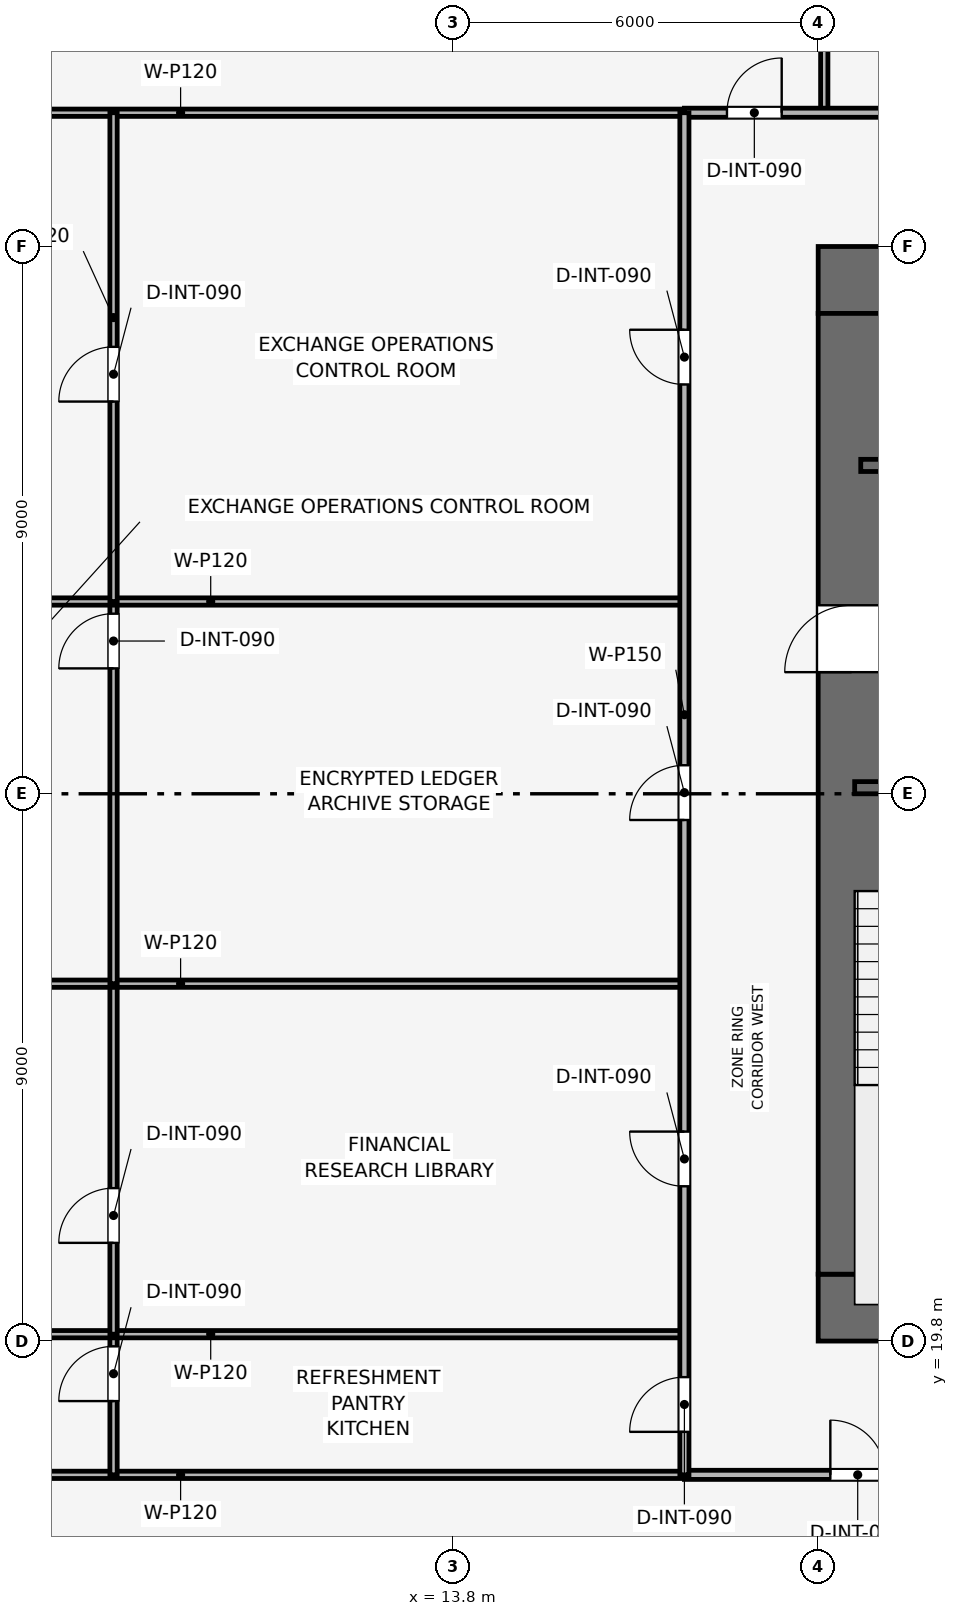
"""IFC4 building model, lengths in metres.
Left out: names, types, materials, properties, quantities, classifications, styles, units other than length and angle.
Written with IfcOpenShell. Run it as: python <this file> out.ifc"""

import sys

from ifc_helpers import new_model, si_unit, direction, frame, frame_2d, origin, place, context, subcontext, project, spatial, rectangle, extrude, element, fill, save


model = new_model("IFC4")
c1 = context("Model", 3, precision=1e-05, world=origin(), true_north=direction((0.0, 1.0)))
c2 = subcontext(c1, "Body", "Model", "MODEL_VIEW")
j1 = project(units=[si_unit("LENGTHUNIT", "METRE"), si_unit("PLANEANGLEUNIT", "RADIAN")], contexts=[c1])
p1 = place(None, origin())
s1 = spatial("IfcSite", under=j1, at=p1, CompositionType="ELEMENT")
p2 = place(p1, origin())
s2 = spatial("IfcBuilding", under=s1, at=p2, CompositionType="ELEMENT")
p3 = place(p2, frame((0.0, 0.0, 53.4)))
s3 = spatial("IfcBuildingStorey", under=s2, at=p3, CompositionType="ELEMENT", Elevation=53.4)
p4 = place(p3, frame((19.8, 20.35, 0.0), z_axis=(0.0, 0.0, 1.0), x_axis=(1.0, 0.0, 0.0)))
e1 = element("IfcWall", 1, at=p4, inside=s3, PredefinedType="SHEAR", context=c2, shape_type="SweptSolid", body=[
    extrude(rectangle(XDim=18.0, YDim=1.1, at=frame_2d((9.0, 0.0))), origin(), (0.0, 0.0, 1.0), 3.9),
])
p5 = place(p4, frame((8.4, 0.0, 0.0)))
e2 = element("IfcOpeningElement", 2, at=p5, cuts=e1, PredefinedType="OPENING", context=c2, shape_type="SweptSolid", body=[
    extrude(rectangle(XDim=1.2, YDim=2.2, at=frame_2d((0.6, 1.1))), frame((0.0, 0.56, 0.0), z_axis=(0.0, -1.0, 0.0), x_axis=(1.0, 0.0, 0.0)), (0.0, 0.0, 1.0), 1.12),
])
p6 = place(p3, frame((19.8, 37.25, 0.0), z_axis=(0.0, 0.0, 1.0), x_axis=(1.0, 0.0, 0.0)))
e3 = element("IfcWall", 3, at=p6, inside=s3, PredefinedType="SHEAR", context=c2, shape_type="SweptSolid", body=[
    extrude(rectangle(XDim=18.0, YDim=1.1, at=frame_2d((9.0, 0.0))), origin(), (0.0, 0.0, 1.0), 3.9),
])
p7 = place(p6, frame((7.05, 0.0, 0.0)))
e4 = element("IfcOpeningElement", 4, at=p7, cuts=e3, PredefinedType="OPENING", context=c2, shape_type="SweptSolid", body=[
    extrude(rectangle(XDim=1.1, YDim=2.15, at=frame_2d((0.55, 1.075))), frame((0.0, 0.56, 0.0), z_axis=(0.0, -1.0, 0.0), x_axis=(1.0, 0.0, 0.0)), (0.0, 0.0, 1.0), 1.12),
])
p8 = place(p3, frame((20.35, 20.9, 0.0), z_axis=(0.0, 0.0, 1.0), x_axis=(0.0, 1.0, 0.0)))
e5 = element("IfcWall", 5, at=p8, inside=s3, PredefinedType="SHEAR", context=c2, shape_type="SweptSolid", body=[
    extrude(rectangle(XDim=15.8, YDim=1.1, at=frame_2d((7.9, 0.0))), origin(), (0.0, 0.0, 1.0), 3.9),
])
p9 = place(p8, frame((9.9, 0.0, 0.0)))
e6 = element("IfcOpeningElement", 6, at=p9, cuts=e5, PredefinedType="OPENING", context=c2, shape_type="SweptSolid", body=[
    extrude(rectangle(XDim=1.1, YDim=2.15, at=frame_2d((0.55, 1.075))), frame((0.0, 0.56, 0.0), z_axis=(0.0, -1.0, 0.0), x_axis=(1.0, 0.0, 0.0)), (0.0, 0.0, 1.0), 1.12),
])
p10 = place(p3, frame((20.4, 28.9, 0.0), z_axis=(0.0, 0.0, 1.0), x_axis=(1.0, 0.0, 0.0)))
e7 = element("IfcWall", 7, at=p10, inside=s3, PredefinedType="SHEAR", context=c2, shape_type="SweptSolid", body=[
    extrude(rectangle(XDim=3.15, YDim=0.2, at=frame_2d((1.575, 0.0))), origin(), (0.0, 0.0, 1.0), 3.65),
])
p11 = place(p10, frame((0.8, 0.0, 0.0)))
e8 = element("IfcOpeningElement", 8, at=p11, cuts=e7, PredefinedType="OPENING", context=c2, shape_type="SweptSolid", body=[
    extrude(rectangle(XDim=1.0, YDim=2.1, at=frame_2d((0.5, 1.05))), frame((0.0, 0.11, 0.0), z_axis=(0.0, -1.0, 0.0), x_axis=(1.0, 0.0, 0.0)), (0.0, 0.0, 1.0), 0.22),
])
p12 = place(p3, frame((20.5, 34.2, 0.0), z_axis=(0.0, 0.0, 1.0), x_axis=(1.0, 0.0, 0.0)))
e9 = element("IfcWall", 9, at=p12, inside=s3, PredefinedType="SHEAR", context=c2, shape_type="SweptSolid", body=[
    extrude(rectangle(XDim=3.05, YDim=0.2, at=frame_2d((1.525, 0.0))), origin(), (0.0, 0.0, 1.0), 3.65),
])
p13 = place(p12, frame((0.75, 0.0, 0.0)))
e10 = element("IfcOpeningElement", 10, at=p13, cuts=e9, PredefinedType="OPENING", context=c2, shape_type="SweptSolid", body=[
    extrude(rectangle(XDim=1.1, YDim=2.15, at=frame_2d((0.55, 1.075))), frame((0.0, 0.11, 0.0), z_axis=(0.0, -1.0, 0.0), x_axis=(1.0, 0.0, 0.0)), (0.0, 0.0, 1.0), 0.22),
])
for number, where, z_axis, x_axis in (
    (11, (19.9, 40.0, 0.0), (0.0, 0.0, 1.0), (0.0, 1.0, 0.0)),
    (12, (1.03, 17.6, 0.0), (0.0, 0.0, 1.0), (1.0, 0.0, 0.0)),
    (13, (1.03, 40.0, 0.0), (0.0, 0.0, 1.0), (1.0, 0.0, 0.0)),
):
    element("IfcWall", number, at=place(p3, frame(where, z_axis=z_axis, x_axis=x_axis)), inside=s3, PredefinedType="PARTITIONING", context=c2, shape_type="SweptSolid", body=[
        extrude(rectangle(XDim=16.57, YDim=0.12, at=frame_2d((8.285, 0.0))), origin(), (0.0, 0.0, 1.0), 2.935),
    ])
p14 = place(p3, frame((8.212, 17.6, 0.0), z_axis=(0.0, 0.0, 1.0), x_axis=(0.0, 1.0, 0.0)))
e14 = element("IfcWall", 14, at=p14, inside=s3, PredefinedType="PARTITIONING", context=c2, shape_type="SweptSolid", body=[
    extrude(rectangle(XDim=2.313, YDim=0.12, at=frame_2d((1.156, 0.0))), origin(), (0.0, 0.0, 1.0), 3.65),
])
p15 = place(p14, frame((1.213, 0.0, 0.0)))
e15 = element("IfcOpeningElement", 15, at=p15, cuts=e14, PredefinedType="OPENING", context=c2, shape_type="SweptSolid", body=[
    extrude(rectangle(XDim=0.9, YDim=2.1, at=frame_2d((0.45, 1.05))), frame((0.0, 0.07, 0.0), z_axis=(0.0, -1.0, 0.0), x_axis=(1.0, 0.0, 0.0)), (0.0, 0.0, 1.0), 0.14),
])
p16 = place(p3, frame((1.03, 19.913, 0.0), z_axis=(0.0, 0.0, 1.0), x_axis=(1.0, 0.0, 0.0)))
e16 = element("IfcWall", 16, at=p16, inside=s3, PredefinedType="PARTITIONING", context=c2, shape_type="SweptSolid", body=[
    extrude(rectangle(XDim=16.57, YDim=0.12, at=frame_2d((8.285, 0.0))), origin(), (0.0, 0.0, 1.0), 2.935),
])
p17 = place(p3, frame((8.212, 19.913, 0.0), z_axis=(0.0, 0.0, 1.0), x_axis=(0.0, 1.0, 0.0)))
e17 = element("IfcWall", 17, at=p17, inside=s3, PredefinedType="PARTITIONING", context=c2, shape_type="SweptSolid", body=[
    extrude(rectangle(XDim=5.764, YDim=0.12, at=frame_2d((2.882, 0.0))), origin(), (0.0, 0.0, 1.0), 3.085),
])
p18 = place(p17, frame((1.502, 0.0, 0.0)))
e18 = element("IfcOpeningElement", 18, at=p18, cuts=e17, PredefinedType="OPENING", context=c2, shape_type="SweptSolid", body=[
    extrude(rectangle(XDim=0.9, YDim=2.1, at=frame_2d((0.45, 1.05))), frame((0.0, 0.07, 0.0), z_axis=(0.0, -1.0, 0.0), x_axis=(1.0, 0.0, 0.0)), (0.0, 0.0, 1.0), 0.14),
])
p19 = place(p3, frame((1.03, 25.677, 0.0), z_axis=(0.0, 0.0, 1.0), x_axis=(1.0, 0.0, 0.0)))
e19 = element("IfcWall", 19, at=p19, inside=s3, PredefinedType="PARTITIONING", context=c2, shape_type="SweptSolid", body=[
    extrude(rectangle(XDim=16.57, YDim=0.12, at=frame_2d((8.285, 0.0))), origin(), (0.0, 0.0, 1.0), 2.935),
])
p20 = place(p3, frame((8.212, 25.677, 0.0), z_axis=(0.0, 0.0, 1.0), x_axis=(0.0, 1.0, 0.0)))
e20 = element("IfcWall", 20, at=p20, inside=s3, PredefinedType="PARTITIONING", context=c2, shape_type="SweptSolid", body=[
    extrude(rectangle(XDim=6.285, YDim=0.12, at=frame_2d((3.143, 0.0))), origin(), (0.0, 0.0, 1.0), 3.085),
])
p21 = place(p20, frame((5.185, 0.0, 0.0)))
e21 = element("IfcOpeningElement", 21, at=p21, cuts=e20, PredefinedType="OPENING", context=c2, shape_type="SweptSolid", body=[
    extrude(rectangle(XDim=0.9, YDim=2.1, at=frame_2d((0.45, 1.05))), frame((0.0, 0.07, 0.0), z_axis=(0.0, -1.0, 0.0), x_axis=(1.0, 0.0, 0.0)), (0.0, 0.0, 1.0), 0.14),
])
p22 = place(p3, frame((1.03, 31.962, 0.0), z_axis=(0.0, 0.0, 1.0), x_axis=(1.0, 0.0, 0.0)))
e22 = element("IfcWall", 22, at=p22, inside=s3, PredefinedType="PARTITIONING", context=c2, shape_type="SweptSolid", body=[
    extrude(rectangle(XDim=16.57, YDim=0.12, at=frame_2d((8.285, 0.0))), origin(), (0.0, 0.0, 1.0), 2.935),
])
p23 = place(p3, frame((8.212, 31.962, 0.0), z_axis=(0.0, 0.0, 1.0), x_axis=(0.0, 1.0, 0.0)))
e23 = element("IfcWall", 23, at=p23, inside=s3, PredefinedType="PARTITIONING", context=c2, shape_type="SweptSolid", body=[
    extrude(rectangle(XDim=8.038, YDim=0.12, at=frame_2d((4.019, 0.0))), origin(), (0.0, 0.0, 1.0), 3.085),
])
p24 = place(p23, frame((3.288, 0.0, 0.0)))
e24 = element("IfcOpeningElement", 24, at=p24, cuts=e23, PredefinedType="OPENING", context=c2, shape_type="SweptSolid", body=[
    extrude(rectangle(XDim=0.9, YDim=2.1, at=frame_2d((0.45, 1.05))), frame((0.0, 0.07, 0.0), z_axis=(0.0, -1.0, 0.0), x_axis=(1.0, 0.0, 0.0)), (0.0, 0.0, 1.0), 0.14),
])
p25 = place(p3, frame((17.6, 17.6, 0.0), z_axis=(0.0, 0.0, 1.0), x_axis=(1.0, 0.0, 0.0)))
e25 = element("IfcWall", 25, at=p25, inside=s3, PredefinedType="PARTITIONING", context=c2, shape_type="SweptSolid", body=[
    extrude(rectangle(XDim=22.4, YDim=0.15, at=frame_2d((11.2, 0.0))), origin(), (0.0, 0.0, 1.0), 3.085),
])
p26 = place(p25, frame((2.4, 0.0, 0.0)))
e26 = element("IfcOpeningElement", 26, at=p26, cuts=e25, PredefinedType="OPENING", context=c2, shape_type="SweptSolid", body=[
    extrude(rectangle(XDim=0.9, YDim=2.1, at=frame_2d((0.45, 1.05))), frame((0.0, 0.085, 0.0), z_axis=(0.0, -1.0, 0.0), x_axis=(1.0, 0.0, 0.0)), (0.0, 0.0, 1.0), 0.17),
])
p27 = place(p25, frame((6.65, 0.0, 0.0)))
e27 = element("IfcOpeningElement", 27, at=p27, cuts=e25, PredefinedType="OPENING", context=c2, shape_type="SweptSolid", body=[
    extrude(rectangle(XDim=0.9, YDim=2.1, at=frame_2d((0.45, 1.05))), frame((0.0, 0.085, 0.0), z_axis=(0.0, -1.0, 0.0), x_axis=(1.0, 0.0, 0.0)), (0.0, 0.0, 1.0), 0.17),
])
p28 = place(p25, frame((9.55, 0.0, 0.0)))
e28 = element("IfcOpeningElement", 28, at=p28, cuts=e25, PredefinedType="OPENING", context=c2, shape_type="SweptSolid", body=[
    extrude(rectangle(XDim=0.9, YDim=2.1, at=frame_2d((0.45, 1.05))), frame((0.0, 0.085, 0.0), z_axis=(0.0, -1.0, 0.0), x_axis=(1.0, 0.0, 0.0)), (0.0, 0.0, 1.0), 0.17),
])
p29 = place(p25, frame((12.3, 0.0, 0.0)))
e29 = element("IfcOpeningElement", 29, at=p29, cuts=e25, PredefinedType="OPENING", context=c2, shape_type="SweptSolid", body=[
    extrude(rectangle(XDim=0.95, YDim=2.1, at=frame_2d((0.475, 1.05))), frame((0.0, 0.085, 0.0), z_axis=(0.0, -1.0, 0.0), x_axis=(1.0, 0.0, 0.0)), (0.0, 0.0, 1.0), 0.17),
])
p30 = place(p25, frame((17.8, 0.0, 0.0)))
e30 = element("IfcOpeningElement", 30, at=p30, cuts=e25, PredefinedType="OPENING", context=c2, shape_type="SweptSolid", body=[
    extrude(rectangle(XDim=0.9, YDim=2.1, at=frame_2d((0.45, 1.05))), frame((0.0, 0.085, 0.0), z_axis=(0.0, -1.0, 0.0), x_axis=(1.0, 0.0, 0.0)), (0.0, 0.0, 1.0), 0.17),
])
p31 = place(p3, frame((17.6, 40.0, 0.0), z_axis=(0.0, 0.0, 1.0), x_axis=(1.0, 0.0, 0.0)))
e31 = element("IfcWall", 31, at=p31, inside=s3, PredefinedType="PARTITIONING", context=c2, shape_type="SweptSolid", body=[
    extrude(rectangle(XDim=22.4, YDim=0.15, at=frame_2d((11.2, 0.0))), origin(), (0.0, 0.0, 1.0), 3.085),
])
p32 = place(p31, frame((0.7, 0.0, 0.0)))
e32 = element("IfcOpeningElement", 32, at=p32, cuts=e31, PredefinedType="OPENING", context=c2, shape_type="SweptSolid", body=[
    extrude(rectangle(XDim=0.9, YDim=2.1, at=frame_2d((0.45, 1.05))), frame((0.0, 0.085, 0.0), z_axis=(0.0, -1.0, 0.0), x_axis=(1.0, 0.0, 0.0)), (0.0, 0.0, 1.0), 0.17),
])
p33 = place(p31, frame((6.378, 0.0, 0.0)))
e33 = element("IfcOpeningElement", 33, at=p33, cuts=e31, PredefinedType="OPENING", context=c2, shape_type="SweptSolid", body=[
    extrude(rectangle(XDim=0.9, YDim=2.1, at=frame_2d((0.45, 1.05))), frame((0.0, 0.085, 0.0), z_axis=(0.0, -1.0, 0.0), x_axis=(1.0, 0.0, 0.0)), (0.0, 0.0, 1.0), 0.17),
])
p34 = place(p31, frame((16.428, 0.0, 0.0)))
e34 = element("IfcOpeningElement", 34, at=p34, cuts=e31, PredefinedType="OPENING", context=c2, shape_type="SweptSolid", body=[
    extrude(rectangle(XDim=0.9, YDim=2.1, at=frame_2d((0.45, 1.05))), frame((0.0, 0.085, 0.0), z_axis=(0.0, -1.0, 0.0), x_axis=(1.0, 0.0, 0.0)), (0.0, 0.0, 1.0), 0.17),
])
p35 = place(p3, frame((17.6, 17.6, 0.0), z_axis=(0.0, 0.0, 1.0), x_axis=(0.0, 1.0, 0.0)))
e35 = element("IfcWall", 35, at=p35, inside=s3, PredefinedType="PARTITIONING", context=c2, shape_type="SweptSolid", body=[
    extrude(rectangle(XDim=22.4, YDim=0.15, at=frame_2d((11.2, 0.0))), origin(), (0.0, 0.0, 1.0), 3.085),
])
p36 = place(p35, frame((0.707, 0.0, 0.0)))
e36 = element("IfcOpeningElement", 36, at=p36, cuts=e35, PredefinedType="OPENING", context=c2, shape_type="SweptSolid", body=[
    extrude(rectangle(XDim=0.9, YDim=2.1, at=frame_2d((0.45, 1.05))), frame((0.0, 0.085, 0.0), z_axis=(0.0, -1.0, 0.0), x_axis=(1.0, 0.0, 0.0)), (0.0, 0.0, 1.0), 0.17),
])
p37 = place(p35, frame((4.745, 0.0, 0.0)))
e37 = element("IfcOpeningElement", 37, at=p37, cuts=e35, PredefinedType="OPENING", context=c2, shape_type="SweptSolid", body=[
    extrude(rectangle(XDim=0.9, YDim=2.1, at=frame_2d((0.45, 1.05))), frame((0.0, 0.085, 0.0), z_axis=(0.0, -1.0, 0.0), x_axis=(1.0, 0.0, 0.0)), (0.0, 0.0, 1.0), 0.17),
])
p38 = place(p35, frame((10.769, 0.0, 0.0)))
e38 = element("IfcOpeningElement", 38, at=p38, cuts=e35, PredefinedType="OPENING", context=c2, shape_type="SweptSolid", body=[
    extrude(rectangle(XDim=0.9, YDim=2.1, at=frame_2d((0.45, 1.05))), frame((0.0, 0.085, 0.0), z_axis=(0.0, -1.0, 0.0), x_axis=(1.0, 0.0, 0.0)), (0.0, 0.0, 1.0), 0.17),
])
p39 = place(p35, frame((17.931, 0.0, 0.0)))
e39 = element("IfcOpeningElement", 39, at=p39, cuts=e35, PredefinedType="OPENING", context=c2, shape_type="SweptSolid", body=[
    extrude(rectangle(XDim=0.9, YDim=2.1, at=frame_2d((0.45, 1.05))), frame((0.0, 0.085, 0.0), z_axis=(0.0, -1.0, 0.0), x_axis=(1.0, 0.0, 0.0)), (0.0, 0.0, 1.0), 0.17),
])
p40 = place(p15, origin())
e40 = element("IfcDoor", 40, at=p40, inside=s3, OperationType="SINGLE_SWING_LEFT", PredefinedType="DOOR", context=c2, shape_type="SweptSolid", body=[
    extrude(rectangle(XDim=0.9, YDim=2.1, at=frame_2d((0.45, 1.05))), frame((0.0, 0.025, 0.0), z_axis=(0.0, -1.0, 0.0), x_axis=(1.0, 0.0, 0.0)), (0.0, 0.0, 1.0), 0.05),
])
fill(e15, e40)
p41 = place(p18, origin())
e41 = element("IfcDoor", 41, at=p41, inside=s3, OperationType="SINGLE_SWING_LEFT", PredefinedType="DOOR", context=c2, shape_type="SweptSolid", body=[
    extrude(rectangle(XDim=0.9, YDim=2.1, at=frame_2d((0.45, 1.05))), frame((0.0, 0.025, 0.0), z_axis=(0.0, -1.0, 0.0), x_axis=(1.0, 0.0, 0.0)), (0.0, 0.0, 1.0), 0.05),
])
fill(e18, e41)
p42 = place(p21, origin())
e42 = element("IfcDoor", 42, at=p42, inside=s3, OperationType="SINGLE_SWING_LEFT", PredefinedType="DOOR", context=c2, shape_type="SweptSolid", body=[
    extrude(rectangle(XDim=0.9, YDim=2.1, at=frame_2d((0.45, 1.05))), frame((0.0, 0.025, 0.0), z_axis=(0.0, -1.0, 0.0), x_axis=(1.0, 0.0, 0.0)), (0.0, 0.0, 1.0), 0.05),
])
fill(e21, e42)
p43 = place(p24, origin())
e43 = element("IfcDoor", 43, at=p43, inside=s3, OperationType="SINGLE_SWING_LEFT", PredefinedType="DOOR", context=c2, shape_type="SweptSolid", body=[
    extrude(rectangle(XDim=0.9, YDim=2.1, at=frame_2d((0.45, 1.05))), frame((0.0, 0.025, 0.0), z_axis=(0.0, -1.0, 0.0), x_axis=(1.0, 0.0, 0.0)), (0.0, 0.0, 1.0), 0.05),
])
fill(e24, e43)
p44 = place(p26, origin())
e44 = element("IfcDoor", 44, at=p44, inside=s3, OperationType="SINGLE_SWING_LEFT", PredefinedType="DOOR", context=c2, shape_type="SweptSolid", body=[
    extrude(rectangle(XDim=0.9, YDim=2.1, at=frame_2d((0.45, 1.05))), frame((0.0, 0.025, 0.0), z_axis=(0.0, -1.0, 0.0), x_axis=(1.0, 0.0, 0.0)), (0.0, 0.0, 1.0), 0.05),
])
fill(e26, e44)
p45 = place(p32, origin())
e45 = element("IfcDoor", 45, at=p45, inside=s3, OperationType="SINGLE_SWING_RIGHT", PredefinedType="DOOR", context=c2, shape_type="SweptSolid", body=[
    extrude(rectangle(XDim=0.9, YDim=2.1, at=frame_2d((0.45, 1.05))), frame((0.0, 0.025, 0.0), z_axis=(0.0, -1.0, 0.0), x_axis=(1.0, 0.0, 0.0)), (0.0, 0.0, 1.0), 0.05),
])
fill(e32, e45)
p46 = place(p36, origin())
e46 = element("IfcDoor", 46, at=p46, inside=s3, OperationType="SINGLE_SWING_LEFT", PredefinedType="DOOR", context=c2, shape_type="SweptSolid", body=[
    extrude(rectangle(XDim=0.9, YDim=2.1, at=frame_2d((0.45, 1.05))), frame((0.0, 0.025, 0.0), z_axis=(0.0, -1.0, 0.0), x_axis=(1.0, 0.0, 0.0)), (0.0, 0.0, 1.0), 0.05),
])
fill(e36, e46)
p47 = place(p37, origin())
e47 = element("IfcDoor", 47, at=p47, inside=s3, OperationType="SINGLE_SWING_RIGHT", PredefinedType="DOOR", context=c2, shape_type="SweptSolid", body=[
    extrude(rectangle(XDim=0.9, YDim=2.1, at=frame_2d((0.45, 1.05))), frame((0.0, 0.025, 0.0), z_axis=(0.0, -1.0, 0.0), x_axis=(1.0, 0.0, 0.0)), (0.0, 0.0, 1.0), 0.05),
])
fill(e37, e47)
p48 = place(p38, origin())
e48 = element("IfcDoor", 48, at=p48, inside=s3, OperationType="SINGLE_SWING_LEFT", PredefinedType="DOOR", context=c2, shape_type="SweptSolid", body=[
    extrude(rectangle(XDim=0.9, YDim=2.1, at=frame_2d((0.45, 1.05))), frame((0.0, 0.025, 0.0), z_axis=(0.0, -1.0, 0.0), x_axis=(1.0, 0.0, 0.0)), (0.0, 0.0, 1.0), 0.05),
])
fill(e38, e48)
p49 = place(p39, origin())
e49 = element("IfcDoor", 49, at=p49, inside=s3, OperationType="SINGLE_SWING_RIGHT", PredefinedType="DOOR", context=c2, shape_type="SweptSolid", body=[
    extrude(rectangle(XDim=0.9, YDim=2.1, at=frame_2d((0.45, 1.05))), frame((0.0, 0.025, 0.0), z_axis=(0.0, -1.0, 0.0), x_axis=(1.0, 0.0, 0.0)), (0.0, 0.0, 1.0), 0.05),
])
fill(e39, e49)
p50 = place(p9, origin())
e50 = element("IfcDoor", 50, at=p50, inside=s3, OperationType="SINGLE_SWING_LEFT", PredefinedType="DOOR", context=c2, shape_type="SweptSolid", body=[
    extrude(rectangle(XDim=1.1, YDim=2.15, at=frame_2d((0.55, 1.075))), frame((0.0, 0.025, 0.0), z_axis=(0.0, -1.0, 0.0), x_axis=(1.0, 0.0, 0.0)), (0.0, 0.0, 1.0), 0.05),
])
fill(e6, e50)
save(model, sys.argv[1])
